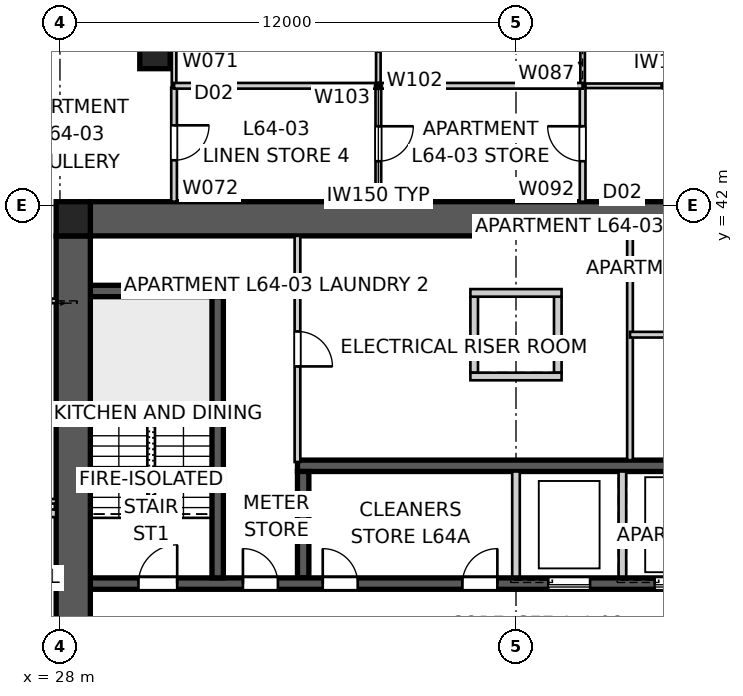
"""IFC4 building model, lengths in metres.
Left out: names, types, materials, properties, quantities, classifications, styles, units other than length and angle.
Written with IfcOpenShell. Run it as: python <this file> out.ifc"""

import sys

from ifc_helpers import new_model, si_unit, direction, frame, frame_2d, origin, origin_2d, place, context, subcontext, project, spatial, polyline, rectangle, outline, extrude, element, fill, save


model = new_model("IFC4")
c1 = context("Model", 3, precision=1e-05, world=origin(), true_north=direction((0.0, 1.0)))
c2 = subcontext(c1, "Body", "Model", "MODEL_VIEW")
j1 = project(units=[si_unit("LENGTHUNIT", "METRE"), si_unit("PLANEANGLEUNIT", "RADIAN")], contexts=[c1])
p1 = place(None, origin())
s1 = spatial("IfcSite", under=j1, at=p1, CompositionType="ELEMENT")
p2 = place(p1, origin())
s2 = spatial("IfcBuilding", under=s1, at=p2, CompositionType="ELEMENT")
p3 = place(p2, frame((0.0, 0.0, 232.0)))
s3 = spatial("IfcBuildingStorey", under=s2, at=p3, CompositionType="ELEMENT", Elevation=232.0)
p4 = place(p3, frame((28.8, 41.65, 0.0), z_axis=(0.0, 0.0, 1.0), x_axis=(1.0, 0.0, 0.0)))
e1 = element("IfcWall", 1, at=p4, inside=s3, PredefinedType="SHEAR", context=c2, shape_type="SweptSolid", body=[
    extrude(outline(polyline([(0.0, -0.45), (22.4, -0.45), (22.4, -0.025), (22.85, -0.025), (22.85, 0.025), (22.4, 0.025), (22.4, 0.45), (0.0, 0.45), (0.0, 0.025), (-0.45, 0.025), (-0.45, -0.025), (0.0, -0.025), (0.0, -0.45)])), origin(), (0.0, 0.0, 1.0), 3.4),
])
p5 = place(p3, frame((28.35, 41.2, 0.0), z_axis=(0.0, 0.0, 1.0), x_axis=(0.0, -1.0, 0.0)))
e2 = element("IfcWall", 2, at=p5, inside=s3, PredefinedType="SHEAR", context=c2, shape_type="SweptSolid", body=[
    extrude(outline(polyline([(0.0, -0.45), (22.4, -0.45), (22.4, -0.025), (22.85, -0.025), (22.85, 0.025), (22.4, 0.025), (22.4, 0.45), (0.0, 0.45), (0.0, 0.025), (-0.45, 0.025), (-0.45, -0.025), (0.0, -0.025), (0.0, -0.45)])), origin(), (0.0, 0.0, 1.0), 3.4),
])
p6 = place(p5, frame((11.14, 0.0, 0.0)))
e3 = element("IfcOpeningElement", 3, at=p6, cuts=e2, PredefinedType="OPENING", context=c2, shape_type="SweptSolid", body=[
    extrude(rectangle(XDim=1.02, YDim=2.4, at=frame_2d((0.51, 1.2))), frame((0.0, 0.46, 0.0), z_axis=(0.0, -1.0, 0.0), x_axis=(1.0, 0.0, 0.0)), (0.0, 0.0, 1.0), 0.92),
])
p7 = place(p3, frame((28.8, 32.05, 0.0), z_axis=(0.0, 0.0, 1.0), x_axis=(1.0, 0.0, 0.0)))
e4 = element("IfcWall", 4, at=p7, inside=s3, PredefinedType="SHEAR", context=c2, shape_type="SweptSolid", body=[
    extrude(rectangle(XDim=22.4, YDim=0.3, at=frame_2d((11.2, 0.0))), origin(), (0.0, 0.0, 1.0), 3.4),
])
p8 = place(p7, frame((19.04, 0.0, 0.0)))
e5 = element("IfcOpeningElement", 5, at=p8, cuts=e4, PredefinedType="OPENING", context=c2, shape_type="SweptSolid", body=[
    extrude(rectangle(XDim=0.92, YDim=2.1, at=frame_2d((0.46, 1.05))), frame((0.0, 0.16, 0.0), z_axis=(0.0, -1.0, 0.0), x_axis=(1.0, 0.0, 0.0)), (0.0, 0.0, 1.0), 0.32),
])
p9 = place(p7, frame((1.265, 0.0, 0.0)))
e6 = element("IfcOpeningElement", 6, at=p9, cuts=e4, PredefinedType="OPENING", context=c2, shape_type="SweptSolid", body=[
    extrude(rectangle(XDim=1.02, YDim=2.1, at=frame_2d((0.51, 1.05))), frame((0.0, 0.16, 0.0), z_axis=(0.0, -1.0, 0.0), x_axis=(1.0, 0.0, 0.0)), (0.0, 0.0, 1.0), 0.32),
])
p10 = place(p7, frame((4.015, 0.0, 0.0)))
e7 = element("IfcOpeningElement", 7, at=p10, cuts=e4, PredefinedType="OPENING", context=c2, shape_type="SweptSolid", body=[
    extrude(rectangle(XDim=0.92, YDim=2.1, at=frame_2d((0.46, 1.05))), frame((0.0, 0.16, 0.0), z_axis=(0.0, -1.0, 0.0), x_axis=(1.0, 0.0, 0.0)), (0.0, 0.0, 1.0), 0.32),
])
p11 = place(p7, frame((6.115, 0.0, 0.0)))
e8 = element("IfcOpeningElement", 8, at=p11, cuts=e4, PredefinedType="OPENING", context=c2, shape_type="SweptSolid", body=[
    extrude(rectangle(XDim=0.92, YDim=2.1, at=frame_2d((0.46, 1.05))), frame((0.0, 0.16, 0.0), z_axis=(0.0, -1.0, 0.0), x_axis=(1.0, 0.0, 0.0)), (0.0, 0.0, 1.0), 0.32),
])
p12 = place(p7, frame((9.79, 0.0, 0.0)))
e9 = element("IfcOpeningElement", 9, at=p12, cuts=e4, PredefinedType="OPENING", context=c2, shape_type="SweptSolid", body=[
    extrude(rectangle(XDim=0.92, YDim=2.1, at=frame_2d((0.46, 1.05))), frame((0.0, 0.16, 0.0), z_axis=(0.0, -1.0, 0.0), x_axis=(1.0, 0.0, 0.0)), (0.0, 0.0, 1.0), 0.32),
])
p13 = place(p7, frame((12.05, 0.0, 0.0)))
e10 = element("IfcOpeningElement", 10, at=p13, cuts=e4, PredefinedType="OPENING", context=c2, shape_type="SweptSolid", body=[
    extrude(rectangle(XDim=1.1, YDim=2.1, at=frame_2d((0.55, 1.05))), frame((0.0, 0.16, 0.0), z_axis=(0.0, -1.0, 0.0), x_axis=(1.0, 0.0, 0.0)), (0.0, 0.0, 1.0), 0.32),
])
p14 = place(p7, frame((14.85, 0.0, 0.0)))
e11 = element("IfcOpeningElement", 11, at=p14, cuts=e4, PredefinedType="OPENING", context=c2, shape_type="SweptSolid", body=[
    extrude(rectangle(XDim=1.1, YDim=2.1, at=frame_2d((0.55, 1.05))), frame((0.0, 0.16, 0.0), z_axis=(0.0, -1.0, 0.0), x_axis=(1.0, 0.0, 0.0)), (0.0, 0.0, 1.0), 0.32),
])
p15 = place(p3, frame((34.25, 35.15, 0.0), z_axis=(0.0, 0.0, 1.0), x_axis=(1.0, 0.0, 0.0)))
e12 = element("IfcWall", 12, at=p15, inside=s3, PredefinedType="SHEAR", context=c2, shape_type="SweptSolid", body=[
    extrude(rectangle(XDim=11.5, YDim=0.3, at=frame_2d((5.75, 0.0))), origin(), (0.0, 0.0, 1.0), 3.4),
])
p16 = place(p3, frame((34.4, 32.2, 0.0), z_axis=(0.0, 0.0, 1.0), x_axis=(0.0, 1.0, 0.0)))
e13 = element("IfcWall", 13, at=p16, inside=s3, PredefinedType="SHEAR", context=c2, shape_type="SweptSolid", body=[
    extrude(rectangle(XDim=2.8, YDim=0.3, at=frame_2d((1.4, 0.0))), origin(), (0.0, 0.0, 1.0), 3.4),
])
for number, where, z_axis, x_axis in (
    (14, (40.0, 32.2, 0.0), (0.0, 0.0, 1.0), (0.0, 1.0, 0.0)),
    (15, (42.8, 32.2, 0.0), (0.0, 0.0, 1.0), (0.0, 1.0, 0.0)),
):
    element("IfcWall", number, at=place(p3, frame(where, z_axis=z_axis, x_axis=x_axis)), inside=s3, PredefinedType="SOLIDWALL", context=c2, shape_type="SweptSolid", body=[
        extrude(rectangle(XDim=2.8, YDim=0.2, at=frame_2d((1.4, 0.0))), origin(), (0.0, 0.0, 1.0), 3.4),
    ])
p17 = place(p3, frame((32.15, 32.2, 0.0), z_axis=(0.0, 0.0, 1.0), x_axis=(0.0, 1.0, 0.0)))
e16 = element("IfcWall", 16, at=p17, inside=s3, PredefinedType="SHEAR", context=c2, shape_type="SweptSolid", body=[
    extrude(rectangle(XDim=7.7, YDim=0.3, at=frame_2d((3.85, 0.0))), origin(), (0.0, 0.0, 1.0), 3.4),
])
p18 = place(p3, frame((28.8, 39.75, 0.0), z_axis=(0.0, 0.0, 1.0), x_axis=(1.0, 0.0, 0.0)))
e17 = element("IfcWall", 17, at=p18, inside=s3, PredefinedType="SHEAR", context=c2, shape_type="SweptSolid", body=[
    extrude(rectangle(XDim=3.5, YDim=0.3, at=frame_2d((1.75, 0.0))), origin(), (0.0, 0.0, 1.0), 3.4),
])
for number, where, z_axis, x_axis in (
    (18, (38.9, 37.6, 0.0), (0.0, 0.0, 1.0), (0.0, 1.0, 0.0)),
    (19, (41.1, 37.6, 0.0), (0.0, 0.0, 1.0), (0.0, 1.0, 0.0)),
):
    element("IfcWall", number, at=place(p3, frame(where, z_axis=z_axis, x_axis=x_axis)), inside=s3, PredefinedType="SOLIDWALL", context=c2, shape_type="SweptSolid", body=[
        extrude(rectangle(XDim=2.0, YDim=0.2, at=frame_2d((1.0, 0.0))), origin(), (0.0, 0.0, 1.0), 3.4),
    ])
for number, where, z_axis, x_axis in (
    (20, (38.8, 37.5, 0.0), (0.0, 0.0, 1.0), (1.0, 0.0, 0.0)),
    (21, (38.8, 39.7, 0.0), (0.0, 0.0, 1.0), (1.0, 0.0, 0.0)),
):
    element("IfcWall", number, at=place(p3, frame(where, z_axis=z_axis, x_axis=x_axis)), inside=s3, PredefinedType="SOLIDWALL", context=c2, shape_type="SweptSolid", body=[
        extrude(rectangle(XDim=2.4, YDim=0.2, at=frame_2d((1.2, 0.0))), origin(), (0.0, 0.0, 1.0), 3.4),
    ])
p19 = place(p3, frame((28.35, 41.65, 0.0), z_axis=(0.0, 0.0, 1.0), x_axis=(1.0, 0.0, 0.0)))
e22 = element("IfcColumn", 22, at=p19, inside=s3, PredefinedType="COLUMN", context=c2, shape_type="SweptSolid", body=[
    extrude(rectangle(XDim=0.9, YDim=0.9, at=origin_2d()), origin(), (0.0, 0.0, 1.0), 3.4),
])
p20 = place(p3, frame((30.5, 46.0, 0.0), z_axis=(0.0, 0.0, 1.0), x_axis=(1.0, 0.0, 0.0)))
e23 = element("IfcColumn", 23, at=p20, inside=s3, PredefinedType="COLUMN", context=c2, shape_type="SweptSolid", body=[
    extrude(rectangle(XDim=0.8, YDim=0.8, at=origin_2d()), origin(), (0.0, 0.0, 1.0), 3.4),
])
p21 = place(p3, frame((27.9, 33.9, 0.0), z_axis=(0.0, 0.0, 1.0), x_axis=(-1.0, 0.0, 0.0)))
e24 = element("IfcWall", 24, at=p21, inside=s3, PredefinedType="PARTITIONING", context=c2, shape_type="SweptSolid", body=[
    extrude(rectangle(XDim=3.3, YDim=0.2, at=frame_2d((1.65, 0.0))), origin(), (0.0, 0.0, 1.0), 3.2),
])
p22 = place(p3, frame((34.25, 41.2, 0.0), z_axis=(0.0, 0.0, 1.0), x_axis=(0.0, -1.0, 0.0)))
e25 = element("IfcWall", 25, at=p22, inside=s3, PredefinedType="SOLIDWALL", context=c2, shape_type="SweptSolid", body=[
    extrude(rectangle(XDim=5.95, YDim=0.15, at=frame_2d((2.975, 0.0))), origin(), (0.0, 0.0, 1.0), 3.2),
])
p23 = place(p22, frame((2.515, 0.0, 0.0)))
e26 = element("IfcOpeningElement", 26, at=p23, cuts=e25, PredefinedType="OPENING", context=c2, shape_type="SweptSolid", body=[
    extrude(rectangle(XDim=0.92, YDim=2.1, at=frame_2d((0.46, 1.05))), frame((0.0, 0.085, 0.0), z_axis=(0.0, -1.0, 0.0), x_axis=(1.0, 0.0, 0.0)), (0.0, 0.0, 1.0), 0.17),
])
p24 = place(p3, frame((43.0, 41.2, 0.0), z_axis=(0.0, 0.0, 1.0), x_axis=(0.0, -1.0, 0.0)))
e27 = element("IfcWall", 27, at=p24, inside=s3, PredefinedType="SOLIDWALL", context=c2, shape_type="SweptSolid", body=[
    extrude(rectangle(XDim=5.9, YDim=0.15, at=frame_2d((2.95, 0.0))), origin(), (0.0, 0.0, 1.0), 3.2),
])
p25 = place(p3, frame((43.0, 38.6, 0.0), z_axis=(0.0, 0.0, 1.0), x_axis=(1.0, 0.0, 0.0)))
e28 = element("IfcWall", 28, at=p25, inside=s3, PredefinedType="SOLIDWALL", context=c2, shape_type="SweptSolid", body=[
    extrude(rectangle(XDim=8.2, YDim=0.15, at=frame_2d((4.1, 0.0))), origin(), (0.0, 0.0, 1.0), 3.2),
])
p26 = place(p25, frame((3.64, 0.0, 0.0)))
e29 = element("IfcOpeningElement", 29, at=p26, cuts=e28, PredefinedType="OPENING", context=c2, shape_type="SweptSolid", body=[
    extrude(rectangle(XDim=0.92, YDim=2.1, at=frame_2d((0.46, 1.05))), frame((0.0, 0.085, 0.0), z_axis=(0.0, -1.0, 0.0), x_axis=(1.0, 0.0, 0.0)), (0.0, 0.0, 1.0), 0.17),
])
p27 = place(p3, frame((21.8, 34.216, 0.0), z_axis=(0.0, 0.0, 1.0), x_axis=(1.0, 0.0, 0.0)))
e30 = element("IfcWall", 30, at=p27, inside=s3, PredefinedType="PARTITIONING", context=c2, shape_type="SweptSolid", body=[
    extrude(rectangle(XDim=6.1, YDim=0.12, at=frame_2d((3.05, 0.0))), origin(), (0.0, 0.0, 1.0), 3.2),
])
p28 = place(p27, frame((1.82, 0.0, 0.0)))
e31 = element("IfcOpeningElement", 31, at=p28, cuts=e30, PredefinedType="OPENING", context=c2, shape_type="SweptSolid", body=[
    extrude(rectangle(XDim=0.96, YDim=2.1, at=frame_2d((0.48, 1.05))), frame((0.0, 0.07, 0.0), z_axis=(0.0, -1.0, 0.0), x_axis=(1.0, 0.0, 0.0)), (0.0, 0.0, 1.0), 0.14),
])
p29 = place(p3, frame((27.9, 39.49, 0.0), z_axis=(0.0, 0.0, 1.0), x_axis=(-1.0, 0.0, 0.0)))
e32 = element("IfcWall", 32, at=p29, inside=s3, PredefinedType="PARTITIONING", context=c2, shape_type="SweptSolid", body=[
    extrude(rectangle(XDim=6.1, YDim=0.12, at=frame_2d((3.05, 0.0))), origin(), (0.0, 0.0, 1.0), 3.2),
])
p30 = place(p29, frame((2.459, 0.0, 0.0)))
e33 = element("IfcOpeningElement", 33, at=p30, cuts=e32, PredefinedType="OPENING", context=c2, shape_type="SweptSolid", body=[
    extrude(rectangle(XDim=0.96, YDim=2.1, at=frame_2d((0.48, 1.05))), frame((0.0, 0.07, 0.0), z_axis=(0.0, -1.0, 0.0), x_axis=(1.0, 0.0, 0.0)), (0.0, 0.0, 1.0), 0.14),
])
p31 = place(p29, frame((0.309, 0.0, 0.0)))
e34 = element("IfcOpeningElement", 34, at=p31, cuts=e32, PredefinedType="OPENING", context=c2, shape_type="SweptSolid", body=[
    extrude(rectangle(XDim=0.96, YDim=2.1, at=frame_2d((0.48, 1.05))), frame((0.0, 0.07, 0.0), z_axis=(0.0, -1.0, 0.0), x_axis=(1.0, 0.0, 0.0)), (0.0, 0.0, 1.0), 0.14),
])
p32 = place(p3, frame((31.003, 48.2, 0.0), z_axis=(0.0, 0.0, 1.0), x_axis=(0.0, -1.0, 0.0)))
e35 = element("IfcWall", 35, at=p32, inside=s3, PredefinedType="PARTITIONING", context=c2, shape_type="SweptSolid", body=[
    extrude(rectangle(XDim=3.1, YDim=0.12, at=frame_2d((1.55, 0.0))), origin(), (0.0, 0.0, 1.0), 3.2),
])
p33 = place(p32, frame((0.77, 0.0, 0.0)))
e36 = element("IfcOpeningElement", 36, at=p33, cuts=e35, PredefinedType="OPENING", context=c2, shape_type="SweptSolid", body=[
    extrude(rectangle(XDim=0.96, YDim=2.1, at=frame_2d((0.48, 1.05))), frame((0.0, 0.07, 0.0), z_axis=(0.0, -1.0, 0.0), x_axis=(1.0, 0.0, 0.0)), (0.0, 0.0, 1.0), 0.14),
])
p34 = place(p3, frame((31.003, 45.1, 0.0), z_axis=(0.0, 0.0, 1.0), x_axis=(0.0, -1.0, 0.0)))
e37 = element("IfcWall", 37, at=p34, inside=s3, PredefinedType="SOLIDWALL", context=c2, shape_type="SweptSolid", body=[
    extrude(rectangle(XDim=3.0, YDim=0.15, at=frame_2d((1.5, 0.0))), origin(), (0.0, 0.0, 1.0), 3.2),
])
p35 = place(p34, frame((0.99, 0.0, 0.0)))
e38 = element("IfcOpeningElement", 38, at=p35, cuts=e37, PredefinedType="OPENING", context=c2, shape_type="SweptSolid", body=[
    extrude(rectangle(XDim=0.92, YDim=2.34, at=frame_2d((0.46, 1.17))), frame((0.0, 0.085, 0.0), z_axis=(0.0, -1.0, 0.0), x_axis=(1.0, 0.0, 0.0)), (0.0, 0.0, 1.0), 0.17),
])
p36 = place(p3, frame((46.074, 45.15, 0.0), z_axis=(0.0, 0.0, 1.0), x_axis=(-1.0, 0.0, 0.0)))
e39 = element("IfcWall", 39, at=p36, inside=s3, PredefinedType="PARTITIONING", context=c2, shape_type="SweptSolid", body=[
    extrude(rectangle(XDim=4.321, YDim=0.12, at=frame_2d((2.16, 0.0))), origin(), (0.0, 0.0, 1.0), 3.2),
])
p37 = place(p3, frame((41.753, 45.15, 0.0), z_axis=(0.0, 0.0, 1.0), x_axis=(0.0, 1.0, 0.0)))
e40 = element("IfcWall", 40, at=p37, inside=s3, PredefinedType="PARTITIONING", context=c2, shape_type="SweptSolid", body=[
    extrude(rectangle(XDim=3.05, YDim=0.12, at=frame_2d((1.525, 0.0))), origin(), (0.0, 0.0, 1.0), 3.2),
])
p38 = place(p37, frame((1.045, 0.0, 0.0)))
e41 = element("IfcOpeningElement", 41, at=p38, cuts=e40, PredefinedType="OPENING", context=c2, shape_type="SweptSolid", body=[
    extrude(rectangle(XDim=0.96, YDim=2.1, at=frame_2d((0.48, 1.05))), frame((0.0, 0.07, 0.0), z_axis=(0.0, -1.0, 0.0), x_axis=(1.0, 0.0, 0.0)), (0.0, 0.0, 1.0), 0.14),
])
p39 = place(p3, frame((41.753, 42.1, 0.0), z_axis=(0.0, 0.0, 1.0), x_axis=(0.0, 1.0, 0.0)))
e42 = element("IfcWall", 42, at=p39, inside=s3, PredefinedType="SOLIDWALL", context=c2, shape_type="SweptSolid", body=[
    extrude(rectangle(XDim=3.05, YDim=0.15, at=frame_2d((1.525, 0.0))), origin(), (0.0, 0.0, 1.0), 3.2),
])
p40 = place(p39, frame((1.065, 0.0, 0.0)))
e43 = element("IfcOpeningElement", 43, at=p40, cuts=e42, PredefinedType="OPENING", context=c2, shape_type="SweptSolid", body=[
    extrude(rectangle(XDim=0.92, YDim=2.34, at=frame_2d((0.46, 1.17))), frame((0.0, 0.085, 0.0), z_axis=(0.0, -1.0, 0.0), x_axis=(1.0, 0.0, 0.0)), (0.0, 0.0, 1.0), 0.17),
])
p41 = place(p3, frame((41.753, 45.15, 0.0), z_axis=(0.0, 0.0, 1.0), x_axis=(-1.0, 0.0, 0.0)))
e44 = element("IfcWall", 44, at=p41, inside=s3, PredefinedType="SOLIDWALL", context=c2, shape_type="SweptSolid", body=[
    extrude(rectangle(XDim=10.751, YDim=0.15, at=frame_2d((5.375, 0.0))), origin(), (0.0, 0.0, 1.0), 3.2),
])
p42 = place(p3, frame((36.378, 48.2, 0.0), z_axis=(0.0, 0.0, 1.0), x_axis=(0.0, -1.0, 0.0)))
e45 = element("IfcWall", 45, at=p42, inside=s3, PredefinedType="PARTITIONING", context=c2, shape_type="SweptSolid", body=[
    extrude(rectangle(XDim=3.05, YDim=0.12, at=frame_2d((1.525, 0.0))), origin(), (0.0, 0.0, 1.0), 3.2),
])
p43 = place(p42, frame((1.195, 0.0, 0.0)))
e46 = element("IfcOpeningElement", 46, at=p43, cuts=e45, PredefinedType="OPENING", context=c2, shape_type="SweptSolid", body=[
    extrude(rectangle(XDim=0.96, YDim=2.1, at=frame_2d((0.48, 1.05))), frame((0.0, 0.07, 0.0), z_axis=(0.0, -1.0, 0.0), x_axis=(1.0, 0.0, 0.0)), (0.0, 0.0, 1.0), 0.14),
])
p44 = place(p3, frame((36.378, 45.15, 0.0), z_axis=(0.0, 0.0, 1.0), x_axis=(0.0, -1.0, 0.0)))
e47 = element("IfcWall", 47, at=p44, inside=s3, PredefinedType="SOLIDWALL", context=c2, shape_type="SweptSolid", body=[
    extrude(rectangle(XDim=3.05, YDim=0.15, at=frame_2d((1.525, 0.0))), origin(), (0.0, 0.0, 1.0), 3.2),
])
p45 = place(p44, frame((1.065, 0.0, 0.0)))
e48 = element("IfcOpeningElement", 48, at=p45, cuts=e47, PredefinedType="OPENING", context=c2, shape_type="SweptSolid", body=[
    extrude(rectangle(XDim=0.92, YDim=2.34, at=frame_2d((0.46, 1.17))), frame((0.0, 0.085, 0.0), z_axis=(0.0, -1.0, 0.0), x_axis=(1.0, 0.0, 0.0)), (0.0, 0.0, 1.0), 0.17),
])
p46 = place(p9, origin())
e49 = element("IfcDoor", 49, at=p46, inside=s3, OperationType="SINGLE_SWING_RIGHT", PredefinedType="DOOR", context=c2, shape_type="SweptSolid", body=[
    extrude(rectangle(XDim=1.02, YDim=2.1, at=frame_2d((0.51, 1.05))), frame((0.0, 0.025, 0.0), z_axis=(0.0, -1.0, 0.0), x_axis=(1.0, 0.0, 0.0)), (0.0, 0.0, 1.0), 0.05),
])
fill(e6, e49)
p47 = place(p10, origin())
e50 = element("IfcDoor", 50, at=p47, inside=s3, OperationType="SINGLE_SWING_LEFT", PredefinedType="DOOR", context=c2, shape_type="SweptSolid", body=[
    extrude(rectangle(XDim=0.92, YDim=2.1, at=frame_2d((0.46, 1.05))), frame((0.0, 0.025, 0.0), z_axis=(0.0, -1.0, 0.0), x_axis=(1.0, 0.0, 0.0)), (0.0, 0.0, 1.0), 0.05),
])
fill(e7, e50)
p48 = place(p23, origin())
e51 = element("IfcDoor", 51, at=p48, inside=s3, OperationType="SINGLE_SWING_RIGHT", PredefinedType="DOOR", context=c2, shape_type="SweptSolid", body=[
    extrude(rectangle(XDim=0.92, YDim=2.1, at=frame_2d((0.46, 1.05))), frame((0.0, 0.025, 0.0), z_axis=(0.0, -1.0, 0.0), x_axis=(1.0, 0.0, 0.0)), (0.0, 0.0, 1.0), 0.05),
])
fill(e26, e51)
p49 = place(p35, origin())
e52 = element("IfcDoor", 52, at=p49, inside=s3, OperationType="SINGLE_SWING_LEFT", PredefinedType="DOOR", context=c2, shape_type="SweptSolid", body=[
    extrude(rectangle(XDim=0.92, YDim=2.34, at=frame_2d((0.46, 1.17))), frame((0.0, 0.025, 0.0), z_axis=(0.0, -1.0, 0.0), x_axis=(1.0, 0.0, 0.0)), (0.0, 0.0, 1.0), 0.05),
])
fill(e38, e52)
p50 = place(p45, origin())
e53 = element("IfcDoor", 53, at=p50, inside=s3, OperationType="SINGLE_SWING_LEFT", PredefinedType="DOOR", context=c2, shape_type="SweptSolid", body=[
    extrude(rectangle(XDim=0.92, YDim=2.34, at=frame_2d((0.46, 1.17))), frame((0.0, 0.025, 0.0), z_axis=(0.0, -1.0, 0.0), x_axis=(1.0, 0.0, 0.0)), (0.0, 0.0, 1.0), 0.05),
])
fill(e48, e53)
p51 = place(p40, origin())
e54 = element("IfcDoor", 54, at=p51, inside=s3, OperationType="SINGLE_SWING_RIGHT", PredefinedType="DOOR", context=c2, shape_type="SweptSolid", body=[
    extrude(rectangle(XDim=0.92, YDim=2.34, at=frame_2d((0.46, 1.17))), frame((0.0, 0.025, 0.0), z_axis=(0.0, -1.0, 0.0), x_axis=(1.0, 0.0, 0.0)), (0.0, 0.0, 1.0), 0.05),
])
fill(e43, e54)
p52 = place(p11, origin())
e55 = element("IfcDoor", 55, at=p52, inside=s3, OperationType="SINGLE_SWING_LEFT", PredefinedType="DOOR", context=c2, shape_type="SweptSolid", body=[
    extrude(rectangle(XDim=0.92, YDim=2.1, at=frame_2d((0.46, 1.05))), frame((0.0, 0.025, 0.0), z_axis=(0.0, -1.0, 0.0), x_axis=(1.0, 0.0, 0.0)), (0.0, 0.0, 1.0), 0.05),
])
fill(e8, e55)
p53 = place(p12, origin())
e56 = element("IfcDoor", 56, at=p53, inside=s3, OperationType="SINGLE_SWING_RIGHT", PredefinedType="DOOR", context=c2, shape_type="SweptSolid", body=[
    extrude(rectangle(XDim=0.92, YDim=2.1, at=frame_2d((0.46, 1.05))), frame((0.0, 0.025, 0.0), z_axis=(0.0, -1.0, 0.0), x_axis=(1.0, 0.0, 0.0)), (0.0, 0.0, 1.0), 0.05),
])
fill(e9, e56)
p54 = place(p13, origin())
e57 = element("IfcDoor", 57, at=p54, inside=s3, OperationType="SLIDING_TO_LEFT", PredefinedType="DOOR", context=c2, shape_type="SweptSolid", body=[
    extrude(rectangle(XDim=1.1, YDim=2.1, at=frame_2d((0.55, 1.05))), frame((0.0, 0.025, 0.0), z_axis=(0.0, -1.0, 0.0), x_axis=(1.0, 0.0, 0.0)), (0.0, 0.0, 1.0), 0.05),
])
fill(e10, e57)
p55 = place(p14, origin())
e58 = element("IfcDoor", 58, at=p55, inside=s3, OperationType="SLIDING_TO_LEFT", PredefinedType="DOOR", context=c2, shape_type="SweptSolid", body=[
    extrude(rectangle(XDim=1.1, YDim=2.1, at=frame_2d((0.55, 1.05))), frame((0.0, 0.025, 0.0), z_axis=(0.0, -1.0, 0.0), x_axis=(1.0, 0.0, 0.0)), (0.0, 0.0, 1.0), 0.05),
])
fill(e11, e58)
save(model, sys.argv[1])
